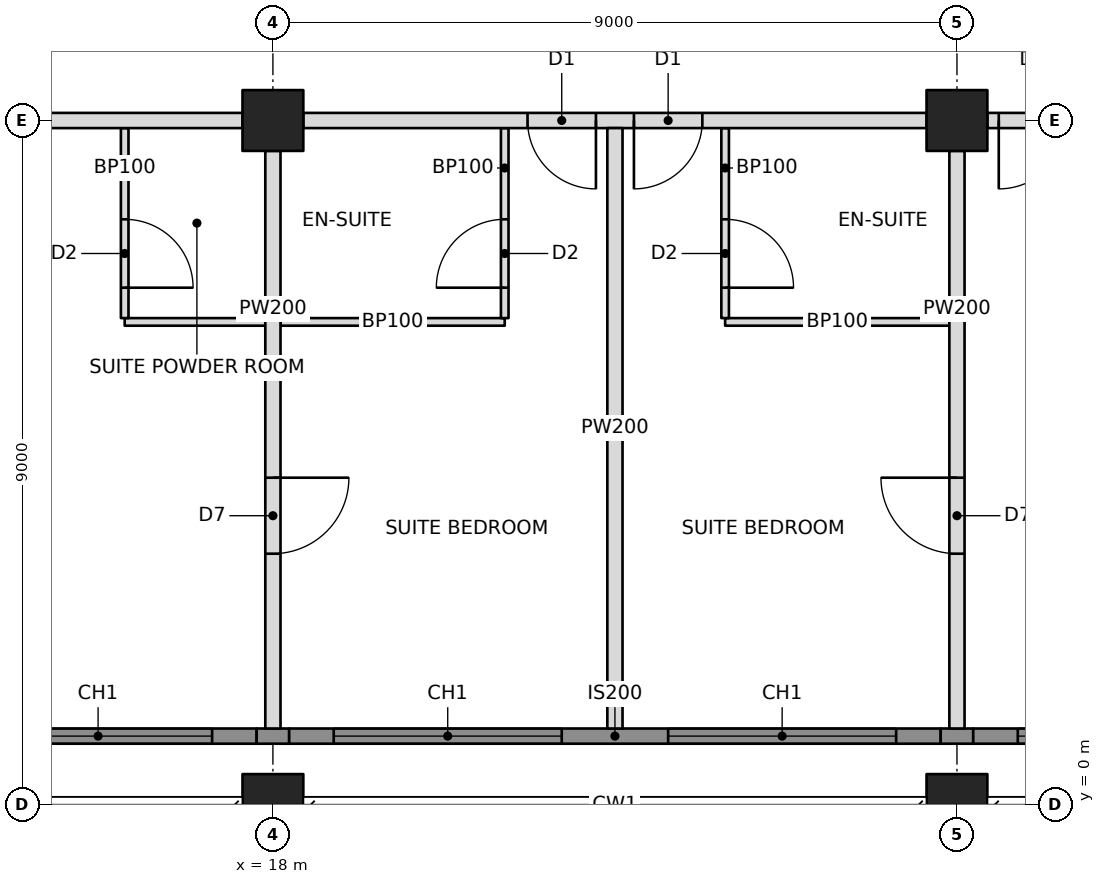
"""IFC4 building model, lengths in metres.
Left out: names, types, materials, properties, quantities, classifications, styles, units other than length and angle.
Written with IfcOpenShell. Run it as: python <this file> out.ifc"""

import sys

from ifc_helpers import new_model, si_unit, direction, frame, frame_2d, origin, origin_2d, place, context, subcontext, project, spatial, rectangle, hollow_rectangle, extrude, element, fill, save


model = new_model("IFC4")
c1 = context("Model", 3, precision=1e-05, world=origin(), true_north=direction((0.0, 1.0)))
c2 = subcontext(c1, "Body", "Model", "MODEL_VIEW")
j1 = project(units=[si_unit("LENGTHUNIT", "METRE"), si_unit("PLANEANGLEUNIT", "RADIAN")], contexts=[c1])
p1 = place(None, origin())
s1 = spatial("IfcSite", under=j1, at=p1, CompositionType="ELEMENT")
p2 = place(p1, origin())
s2 = spatial("IfcBuilding", under=s1, at=p2, CompositionType="ELEMENT")
p3 = place(p2, frame((0.0, 0.0, 218.2)))
s3 = spatial("IfcBuildingStorey", under=s2, at=p3, CompositionType="ELEMENT", Elevation=218.2)
p4 = place(p3, frame((18.0, 0.0, 0.0), z_axis=(0.0, 0.0, 1.0), x_axis=(1.0, 0.0, 0.0)))
e1 = element("IfcColumn", 1, at=p4, inside=s3, PredefinedType="COLUMN", context=c2, shape_type="SweptSolid", body=[
    extrude(hollow_rectangle(XDim=0.8, YDim=0.8, WallThickness=0.06, at=origin_2d()), origin(), (0.0, 0.0, 1.0), 3.4),
])
p5 = place(p3, frame((18.0, 9.0, 0.0), z_axis=(0.0, 0.0, 1.0), x_axis=(1.0, 0.0, 0.0)))
e2 = element("IfcColumn", 2, at=p5, inside=s3, PredefinedType="COLUMN", context=c2, shape_type="SweptSolid", body=[
    extrude(hollow_rectangle(XDim=0.8, YDim=0.8, WallThickness=0.1, at=origin_2d()), origin(), (0.0, 0.0, 1.0), 3.4),
])
p6 = place(p3, frame((27.0, 0.0, 0.0), z_axis=(0.0, 0.0, 1.0), x_axis=(1.0, 0.0, 0.0)))
e3 = element("IfcColumn", 3, at=p6, inside=s3, PredefinedType="COLUMN", context=c2, shape_type="SweptSolid", body=[
    extrude(hollow_rectangle(XDim=0.8, YDim=0.8, WallThickness=0.06, at=origin_2d()), origin(), (0.0, 0.0, 1.0), 3.4),
])
p7 = place(p3, frame((27.0, 9.0, 0.0), z_axis=(0.0, 0.0, 1.0), x_axis=(1.0, 0.0, 0.0)))
e4 = element("IfcColumn", 4, at=p7, inside=s3, PredefinedType="COLUMN", context=c2, shape_type="SweptSolid", body=[
    extrude(hollow_rectangle(XDim=0.8, YDim=0.8, WallThickness=0.1, at=origin_2d()), origin(), (0.0, 0.0, 1.0), 3.4),
])
p8 = place(p3, frame((9.4, 9.0, 0.0), z_axis=(0.0, 0.0, 1.0), x_axis=(1.0, 0.0, 0.0)))
e5 = element("IfcWall", 5, at=p8, inside=s3, PredefinedType="PARTITIONING", context=c2, shape_type="SweptSolid", body=[
    extrude(rectangle(XDim=8.2, YDim=0.2, at=frame_2d((4.1, 0.0))), origin(), (0.0, 0.0, 1.0), 2.21),
])
p9 = place(p8, frame((0.15, 0.0, 0.0)))
e6 = element("IfcOpeningElement", 6, at=p9, cuts=e5, PredefinedType="OPENING", context=c2, shape_type="SweptSolid", body=[
    extrude(rectangle(XDim=0.9, YDim=2.1, at=frame_2d((0.45, 1.05))), frame((0.0, 0.11, 0.0), z_axis=(0.0, -1.0, 0.0), x_axis=(1.0, 0.0, 0.0)), (0.0, 0.0, 1.0), 0.22),
])
p10 = place(p3, frame((18.4, 9.0, 0.0), z_axis=(0.0, 0.0, 1.0), x_axis=(1.0, 0.0, 0.0)))
e7 = element("IfcWall", 7, at=p10, inside=s3, PredefinedType="PARTITIONING", context=c2, shape_type="SweptSolid", body=[
    extrude(rectangle(XDim=8.2, YDim=0.2, at=frame_2d((4.1, 0.0))), origin(), (0.0, 0.0, 1.0), 2.21),
])
p11 = place(p10, frame((2.95, 0.0, 0.0)))
e8 = element("IfcOpeningElement", 8, at=p11, cuts=e7, PredefinedType="OPENING", context=c2, shape_type="SweptSolid", body=[
    extrude(rectangle(XDim=0.9, YDim=2.1, at=frame_2d((0.45, 1.05))), frame((0.0, 0.11, 0.0), z_axis=(0.0, -1.0, 0.0), x_axis=(1.0, 0.0, 0.0)), (0.0, 0.0, 1.0), 0.22),
])
p12 = place(p10, frame((4.35, 0.0, 0.0)))
e9 = element("IfcOpeningElement", 9, at=p12, cuts=e7, PredefinedType="OPENING", context=c2, shape_type="SweptSolid", body=[
    extrude(rectangle(XDim=0.9, YDim=2.1, at=frame_2d((0.45, 1.05))), frame((0.0, 0.11, 0.0), z_axis=(0.0, -1.0, 0.0), x_axis=(1.0, 0.0, 0.0)), (0.0, 0.0, 1.0), 0.22),
])
p13 = place(p3, frame((27.4, 9.0, 0.0), z_axis=(0.0, 0.0, 1.0), x_axis=(1.0, 0.0, 0.0)))
e10 = element("IfcWall", 10, at=p13, inside=s3, PredefinedType="PARTITIONING", context=c2, shape_type="SweptSolid", body=[
    extrude(rectangle(XDim=8.2, YDim=0.2, at=frame_2d((4.1, 0.0))), origin(), (0.0, 0.0, 1.0), 2.21),
])
p14 = place(p13, frame((0.15, 0.0, 0.0)))
e11 = element("IfcOpeningElement", 11, at=p14, cuts=e10, PredefinedType="OPENING", context=c2, shape_type="SweptSolid", body=[
    extrude(rectangle(XDim=0.9, YDim=2.1, at=frame_2d((0.45, 1.05))), frame((0.0, 0.11, 0.0), z_axis=(0.0, -1.0, 0.0), x_axis=(1.0, 0.0, 0.0)), (0.0, 0.0, 1.0), 0.22),
])
p15 = place(p3, frame((18.0, 8.6, 0.0), z_axis=(0.0, 0.0, 1.0), x_axis=(0.0, -1.0, 0.0)))
e12 = element("IfcWall", 12, at=p15, inside=s3, PredefinedType="PARTITIONING", context=c2, shape_type="SweptSolid", body=[
    extrude(rectangle(XDim=7.6, YDim=0.2, at=frame_2d((3.8, 0.0))), origin(), (0.0, 0.0, 1.0), 2.203),
])
p16 = place(p15, frame((4.3, 0.0, 0.0)))
e13 = element("IfcOpeningElement", 13, at=p16, cuts=e12, PredefinedType="OPENING", context=c2, shape_type="SweptSolid", body=[
    extrude(rectangle(XDim=1.0, YDim=2.1, at=frame_2d((0.5, 1.05))), frame((0.0, 0.11, 0.0), z_axis=(0.0, -1.0, 0.0), x_axis=(1.0, 0.0, 0.0)), (0.0, 0.0, 1.0), 0.22),
])
p17 = place(p3, frame((22.5, 8.9, 0.0), z_axis=(0.0, 0.0, 1.0), x_axis=(0.0, -1.0, 0.0)))
e14 = element("IfcWall", 14, at=p17, inside=s3, PredefinedType="PARTITIONING", context=c2, shape_type="SweptSolid", body=[
    extrude(rectangle(XDim=7.9, YDim=0.2, at=frame_2d((3.95, 0.0))), origin(), (0.0, 0.0, 1.0), 2.21),
])
p18 = place(p3, frame((27.0, 8.6, 0.0), z_axis=(0.0, 0.0, 1.0), x_axis=(0.0, -1.0, 0.0)))
e15 = element("IfcWall", 15, at=p18, inside=s3, PredefinedType="PARTITIONING", context=c2, shape_type="SweptSolid", body=[
    extrude(rectangle(XDim=7.6, YDim=0.2, at=frame_2d((3.8, 0.0))), origin(), (0.0, 0.0, 1.0), 2.203),
])
p19 = place(p18, frame((4.3, 0.0, 0.0)))
e16 = element("IfcOpeningElement", 16, at=p19, cuts=e15, PredefinedType="OPENING", context=c2, shape_type="SweptSolid", body=[
    extrude(rectangle(XDim=1.0, YDim=2.1, at=frame_2d((0.5, 1.05))), frame((0.0, 0.11, 0.0), z_axis=(0.0, -1.0, 0.0), x_axis=(1.0, 0.0, 0.0)), (0.0, 0.0, 1.0), 0.22),
])
p20 = place(p3, frame((16.05, 6.35, 0.0), z_axis=(0.0, 0.0, 1.0), x_axis=(1.0, 0.0, 0.0)))
e17 = element("IfcWall", 17, at=p20, inside=s3, PredefinedType="PARTITIONING", context=c2, shape_type="SweptSolid", body=[
    extrude(rectangle(XDim=1.85, YDim=0.1, at=frame_2d((0.925, 0.0))), origin(), (0.0, 0.0, 1.0), 2.202),
])
p21 = place(p3, frame((16.05, 8.9, 0.0), z_axis=(0.0, 0.0, 1.0), x_axis=(0.0, -1.0, 0.0)))
e18 = element("IfcWall", 18, at=p21, inside=s3, PredefinedType="PARTITIONING", context=c2, shape_type="SweptSolid", body=[
    extrude(rectangle(XDim=2.5, YDim=0.1, at=frame_2d((1.25, 0.0))), origin(), (0.0, 0.0, 1.0), 2.21),
])
p22 = place(p21, frame((1.2, 0.0, 0.0)))
e19 = element("IfcOpeningElement", 19, at=p22, cuts=e18, PredefinedType="OPENING", context=c2, shape_type="SweptSolid", body=[
    extrude(rectangle(XDim=0.9, YDim=2.1, at=frame_2d((0.45, 1.05))), frame((0.0, 0.06, 0.0), z_axis=(0.0, -1.0, 0.0), x_axis=(1.0, 0.0, 0.0)), (0.0, 0.0, 1.0), 0.12),
])
p23 = place(p3, frame((18.1, 6.35, 0.0), z_axis=(0.0, 0.0, 1.0), x_axis=(1.0, 0.0, 0.0)))
e20 = element("IfcWall", 20, at=p23, inside=s3, PredefinedType="PARTITIONING", context=c2, shape_type="SweptSolid", body=[
    extrude(rectangle(XDim=2.95, YDim=0.1, at=frame_2d((1.475, 0.0))), origin(), (0.0, 0.0, 1.0), 2.202),
])
p24 = place(p3, frame((21.05, 8.9, 0.0), z_axis=(0.0, 0.0, 1.0), x_axis=(0.0, -1.0, 0.0)))
e21 = element("IfcWall", 21, at=p24, inside=s3, PredefinedType="PARTITIONING", context=c2, shape_type="SweptSolid", body=[
    extrude(rectangle(XDim=2.5, YDim=0.1, at=frame_2d((1.25, 0.0))), origin(), (0.0, 0.0, 1.0), 2.21),
])
p25 = place(p24, frame((1.2, 0.0, 0.0)))
e22 = element("IfcOpeningElement", 22, at=p25, cuts=e21, PredefinedType="OPENING", context=c2, shape_type="SweptSolid", body=[
    extrude(rectangle(XDim=0.9, YDim=2.1, at=frame_2d((0.45, 1.05))), frame((0.0, 0.06, 0.0), z_axis=(0.0, -1.0, 0.0), x_axis=(1.0, 0.0, 0.0)), (0.0, 0.0, 1.0), 0.12),
])
p26 = place(p3, frame((23.95, 6.35, 0.0), z_axis=(0.0, 0.0, 1.0), x_axis=(1.0, 0.0, 0.0)))
e23 = element("IfcWall", 23, at=p26, inside=s3, PredefinedType="PARTITIONING", context=c2, shape_type="SweptSolid", body=[
    extrude(rectangle(XDim=2.95, YDim=0.1, at=frame_2d((1.475, 0.0))), origin(), (0.0, 0.0, 1.0), 2.202),
])
p27 = place(p3, frame((23.95, 8.9, 0.0), z_axis=(0.0, 0.0, 1.0), x_axis=(0.0, -1.0, 0.0)))
e24 = element("IfcWall", 24, at=p27, inside=s3, PredefinedType="PARTITIONING", context=c2, shape_type="SweptSolid", body=[
    extrude(rectangle(XDim=2.5, YDim=0.1, at=frame_2d((1.25, 0.0))), origin(), (0.0, 0.0, 1.0), 2.21),
])
p28 = place(p27, frame((1.2, 0.0, 0.0)))
e25 = element("IfcOpeningElement", 25, at=p28, cuts=e24, PredefinedType="OPENING", context=c2, shape_type="SweptSolid", body=[
    extrude(rectangle(XDim=0.9, YDim=2.1, at=frame_2d((0.45, 1.05))), frame((0.0, 0.06, 0.0), z_axis=(0.0, -1.0, 0.0), x_axis=(1.0, 0.0, 0.0)), (0.0, 0.0, 1.0), 0.12),
])
p29 = place(p3, frame((9.215, 0.9, 0.0), z_axis=(0.0, 0.0, 1.0), x_axis=(1.0, 0.0, 0.0)))
e26 = element("IfcWall", 26, at=p29, inside=s3, PredefinedType="SOLIDWALL", context=c2, shape_type="SweptSolid", body=[
    extrude(rectangle(XDim=8.571, YDim=0.2, at=frame_2d((4.285, 0.0))), origin(), (0.0, 0.0, 1.0), 3.15),
])
p30 = place(p29, frame((0.585, 0.0, 0.6)))
e27 = element("IfcOpeningElement", 27, at=p30, cuts=e26, PredefinedType="OPENING", context=c2, shape_type="SweptSolid", body=[
    extrude(rectangle(XDim=3.0, YDim=2.2, at=frame_2d((1.5, 1.1))), frame((0.0, 0.11, 0.0), z_axis=(0.0, -1.0, 0.0), x_axis=(1.0, 0.0, 0.0)), (0.0, 0.0, 1.0), 0.22),
])
p31 = place(p29, frame((4.985, 0.0, 0.6)))
e28 = element("IfcOpeningElement", 28, at=p31, cuts=e26, PredefinedType="OPENING", context=c2, shape_type="SweptSolid", body=[
    extrude(rectangle(XDim=3.0, YDim=2.2, at=frame_2d((1.5, 1.1))), frame((0.0, 0.11, 0.0), z_axis=(0.0, -1.0, 0.0), x_axis=(1.0, 0.0, 0.0)), (0.0, 0.0, 1.0), 0.22),
])
p32 = place(p3, frame((17.786, 0.9, 0.0), z_axis=(0.0, 0.0, 1.0), x_axis=(1.0, 0.0, 0.0)))
e29 = element("IfcWall", 29, at=p32, inside=s3, PredefinedType="SOLIDWALL", context=c2, shape_type="SweptSolid", body=[
    extrude(rectangle(XDim=0.428, YDim=0.2, at=frame_2d((0.214, 0.0))), origin(), (0.0, 0.0, 1.0), 2.202),
])
p33 = place(p3, frame((18.214, 0.9, 0.0), z_axis=(0.0, 0.0, 1.0), x_axis=(1.0, 0.0, 0.0)))
e30 = element("IfcWall", 30, at=p33, inside=s3, PredefinedType="SOLIDWALL", context=c2, shape_type="SweptSolid", body=[
    extrude(rectangle(XDim=8.572, YDim=0.2, at=frame_2d((4.286, 0.0))), origin(), (0.0, 0.0, 1.0), 3.15),
])
p34 = place(p33, frame((0.586, 0.0, 0.6)))
e31 = element("IfcOpeningElement", 31, at=p34, cuts=e30, PredefinedType="OPENING", context=c2, shape_type="SweptSolid", body=[
    extrude(rectangle(XDim=3.0, YDim=2.2, at=frame_2d((1.5, 1.1))), frame((0.0, 0.11, 0.0), z_axis=(0.0, -1.0, 0.0), x_axis=(1.0, 0.0, 0.0)), (0.0, 0.0, 1.0), 0.22),
])
p35 = place(p33, frame((4.986, 0.0, 0.6)))
e32 = element("IfcOpeningElement", 32, at=p35, cuts=e30, PredefinedType="OPENING", context=c2, shape_type="SweptSolid", body=[
    extrude(rectangle(XDim=3.0, YDim=2.2, at=frame_2d((1.5, 1.1))), frame((0.0, 0.11, 0.0), z_axis=(0.0, -1.0, 0.0), x_axis=(1.0, 0.0, 0.0)), (0.0, 0.0, 1.0), 0.22),
])
p36 = place(p3, frame((26.786, 0.9, 0.0), z_axis=(0.0, 0.0, 1.0), x_axis=(1.0, 0.0, 0.0)))
e33 = element("IfcWall", 33, at=p36, inside=s3, PredefinedType="SOLIDWALL", context=c2, shape_type="SweptSolid", body=[
    extrude(rectangle(XDim=0.428, YDim=0.2, at=frame_2d((0.214, 0.0))), origin(), (0.0, 0.0, 1.0), 2.202),
])
p37 = place(p3, frame((27.214, 0.9, 0.0), z_axis=(0.0, 0.0, 1.0), x_axis=(1.0, 0.0, 0.0)))
e34 = element("IfcWall", 34, at=p37, inside=s3, PredefinedType="SOLIDWALL", context=c2, shape_type="SweptSolid", body=[
    extrude(rectangle(XDim=8.571, YDim=0.2, at=frame_2d((4.285, 0.0))), origin(), (0.0, 0.0, 1.0), 3.15),
])
p38 = place(p37, frame((0.586, 0.0, 0.6)))
e35 = element("IfcOpeningElement", 35, at=p38, cuts=e34, PredefinedType="OPENING", context=c2, shape_type="SweptSolid", body=[
    extrude(rectangle(XDim=3.0, YDim=2.2, at=frame_2d((1.5, 1.1))), frame((0.0, 0.11, 0.0), z_axis=(0.0, -1.0, 0.0), x_axis=(1.0, 0.0, 0.0)), (0.0, 0.0, 1.0), 0.22),
])
p39 = place(p37, frame((4.986, 0.0, 0.6)))
e36 = element("IfcOpeningElement", 36, at=p39, cuts=e34, PredefinedType="OPENING", context=c2, shape_type="SweptSolid", body=[
    extrude(rectangle(XDim=3.0, YDim=2.2, at=frame_2d((1.5, 1.1))), frame((0.0, 0.11, 0.0), z_axis=(0.0, -1.0, 0.0), x_axis=(1.0, 0.0, 0.0)), (0.0, 0.0, 1.0), 0.22),
])
p40 = place(p31, origin())
e37 = element("IfcWindow", 37, at=p40, inside=s3, PartitioningType="TRIPLE_PANEL_VERTICAL", PredefinedType="WINDOW", context=c2, shape_type="SweptSolid", body=[
    extrude(rectangle(XDim=3.0, YDim=2.2, at=frame_2d((1.5, 1.1))), frame((0.0, 0.03, 0.0), z_axis=(0.0, -1.0, 0.0), x_axis=(1.0, 0.0, 0.0)), (0.0, 0.0, 1.0), 0.06),
])
fill(e28, e37)
p41 = place(p34, origin())
e38 = element("IfcWindow", 38, at=p41, inside=s3, PartitioningType="TRIPLE_PANEL_VERTICAL", PredefinedType="WINDOW", context=c2, shape_type="SweptSolid", body=[
    extrude(rectangle(XDim=3.0, YDim=2.2, at=frame_2d((1.5, 1.1))), frame((0.0, 0.03, 0.0), z_axis=(0.0, -1.0, 0.0), x_axis=(1.0, 0.0, 0.0)), (0.0, 0.0, 1.0), 0.06),
])
fill(e31, e38)
p42 = place(p35, origin())
e39 = element("IfcWindow", 39, at=p42, inside=s3, PartitioningType="TRIPLE_PANEL_VERTICAL", PredefinedType="WINDOW", context=c2, shape_type="SweptSolid", body=[
    extrude(rectangle(XDim=3.0, YDim=2.2, at=frame_2d((1.5, 1.1))), frame((0.0, 0.03, 0.0), z_axis=(0.0, -1.0, 0.0), x_axis=(1.0, 0.0, 0.0)), (0.0, 0.0, 1.0), 0.06),
])
fill(e32, e39)
p43 = place(p38, origin())
e40 = element("IfcWindow", 40, at=p43, inside=s3, PartitioningType="TRIPLE_PANEL_VERTICAL", PredefinedType="WINDOW", context=c2, shape_type="SweptSolid", body=[
    extrude(rectangle(XDim=3.0, YDim=2.2, at=frame_2d((1.5, 1.1))), frame((0.0, 0.03, 0.0), z_axis=(0.0, -1.0, 0.0), x_axis=(1.0, 0.0, 0.0)), (0.0, 0.0, 1.0), 0.06),
])
fill(e35, e40)
p44 = place(p16, origin())
e41 = element("IfcDoor", 41, at=p44, inside=s3, OperationType="SINGLE_SWING_LEFT", PredefinedType="DOOR", context=c2, shape_type="SweptSolid", body=[
    extrude(rectangle(XDim=1.0, YDim=2.1, at=frame_2d((0.5, 1.05))), frame((0.0, 0.025, 0.0), z_axis=(0.0, -1.0, 0.0), x_axis=(1.0, 0.0, 0.0)), (0.0, 0.0, 1.0), 0.05),
])
fill(e13, e41)
p45 = place(p19, frame((1.0, 0.0, 0.0), z_axis=(0.0, 0.0, 1.0), x_axis=(-1.0, 0.0, 0.0)))
e42 = element("IfcDoor", 42, at=p45, inside=s3, OperationType="SINGLE_SWING_RIGHT", PredefinedType="DOOR", context=c2, shape_type="SweptSolid", body=[
    extrude(rectangle(XDim=1.0, YDim=2.1, at=frame_2d((0.5, 1.05))), frame((0.0, 0.025, 0.0), z_axis=(0.0, -1.0, 0.0), x_axis=(1.0, 0.0, 0.0)), (0.0, 0.0, 1.0), 0.05),
])
fill(e16, e42)
p46 = place(p22, origin())
e43 = element("IfcDoor", 43, at=p46, inside=s3, OperationType="SINGLE_SWING_RIGHT", PredefinedType="DOOR", context=c2, shape_type="SweptSolid", body=[
    extrude(rectangle(XDim=0.9, YDim=2.1, at=frame_2d((0.45, 1.05))), frame((0.0, 0.025, 0.0), z_axis=(0.0, -1.0, 0.0), x_axis=(1.0, 0.0, 0.0)), (0.0, 0.0, 1.0), 0.05),
])
fill(e19, e43)
p47 = place(p25, frame((0.9, 0.0, 0.0), z_axis=(0.0, 0.0, 1.0), x_axis=(-1.0, 0.0, 0.0)))
e44 = element("IfcDoor", 44, at=p47, inside=s3, OperationType="SINGLE_SWING_LEFT", PredefinedType="DOOR", context=c2, shape_type="SweptSolid", body=[
    extrude(rectangle(XDim=0.9, YDim=2.1, at=frame_2d((0.45, 1.05))), frame((0.0, 0.025, 0.0), z_axis=(0.0, -1.0, 0.0), x_axis=(1.0, 0.0, 0.0)), (0.0, 0.0, 1.0), 0.05),
])
fill(e22, e44)
p48 = place(p11, frame((0.9, 0.0, 0.0), z_axis=(0.0, 0.0, 1.0), x_axis=(-1.0, 0.0, 0.0)))
e45 = element("IfcDoor", 45, at=p48, inside=s3, OperationType="SINGLE_SWING_LEFT", PredefinedType="DOOR", context=c2, shape_type="SweptSolid", body=[
    extrude(rectangle(XDim=0.9, YDim=2.1, at=frame_2d((0.45, 1.05))), frame((0.0, 0.025, 0.0), z_axis=(0.0, -1.0, 0.0), x_axis=(1.0, 0.0, 0.0)), (0.0, 0.0, 1.0), 0.05),
])
fill(e8, e45)
p49 = place(p28, origin())
e46 = element("IfcDoor", 46, at=p49, inside=s3, OperationType="SINGLE_SWING_RIGHT", PredefinedType="DOOR", context=c2, shape_type="SweptSolid", body=[
    extrude(rectangle(XDim=0.9, YDim=2.1, at=frame_2d((0.45, 1.05))), frame((0.0, 0.025, 0.0), z_axis=(0.0, -1.0, 0.0), x_axis=(1.0, 0.0, 0.0)), (0.0, 0.0, 1.0), 0.05),
])
fill(e25, e46)
p50 = place(p12, frame((0.9, 0.0, 0.0), z_axis=(0.0, 0.0, 1.0), x_axis=(-1.0, 0.0, 0.0)))
e47 = element("IfcDoor", 47, at=p50, inside=s3, OperationType="SINGLE_SWING_RIGHT", PredefinedType="DOOR", context=c2, shape_type="SweptSolid", body=[
    extrude(rectangle(XDim=0.9, YDim=2.1, at=frame_2d((0.45, 1.05))), frame((0.0, 0.025, 0.0), z_axis=(0.0, -1.0, 0.0), x_axis=(1.0, 0.0, 0.0)), (0.0, 0.0, 1.0), 0.05),
])
fill(e9, e47)
p51 = place(p14, frame((0.9, 0.0, 0.0), z_axis=(0.0, 0.0, 1.0), x_axis=(-1.0, 0.0, 0.0)))
e48 = element("IfcDoor", 48, at=p51, inside=s3, OperationType="SINGLE_SWING_RIGHT", PredefinedType="DOOR", context=c2, shape_type="SweptSolid", body=[
    extrude(rectangle(XDim=0.9, YDim=2.1, at=frame_2d((0.45, 1.05))), frame((0.0, 0.025, 0.0), z_axis=(0.0, -1.0, 0.0), x_axis=(1.0, 0.0, 0.0)), (0.0, 0.0, 1.0), 0.05),
])
fill(e11, e48)
save(model, sys.argv[1])
